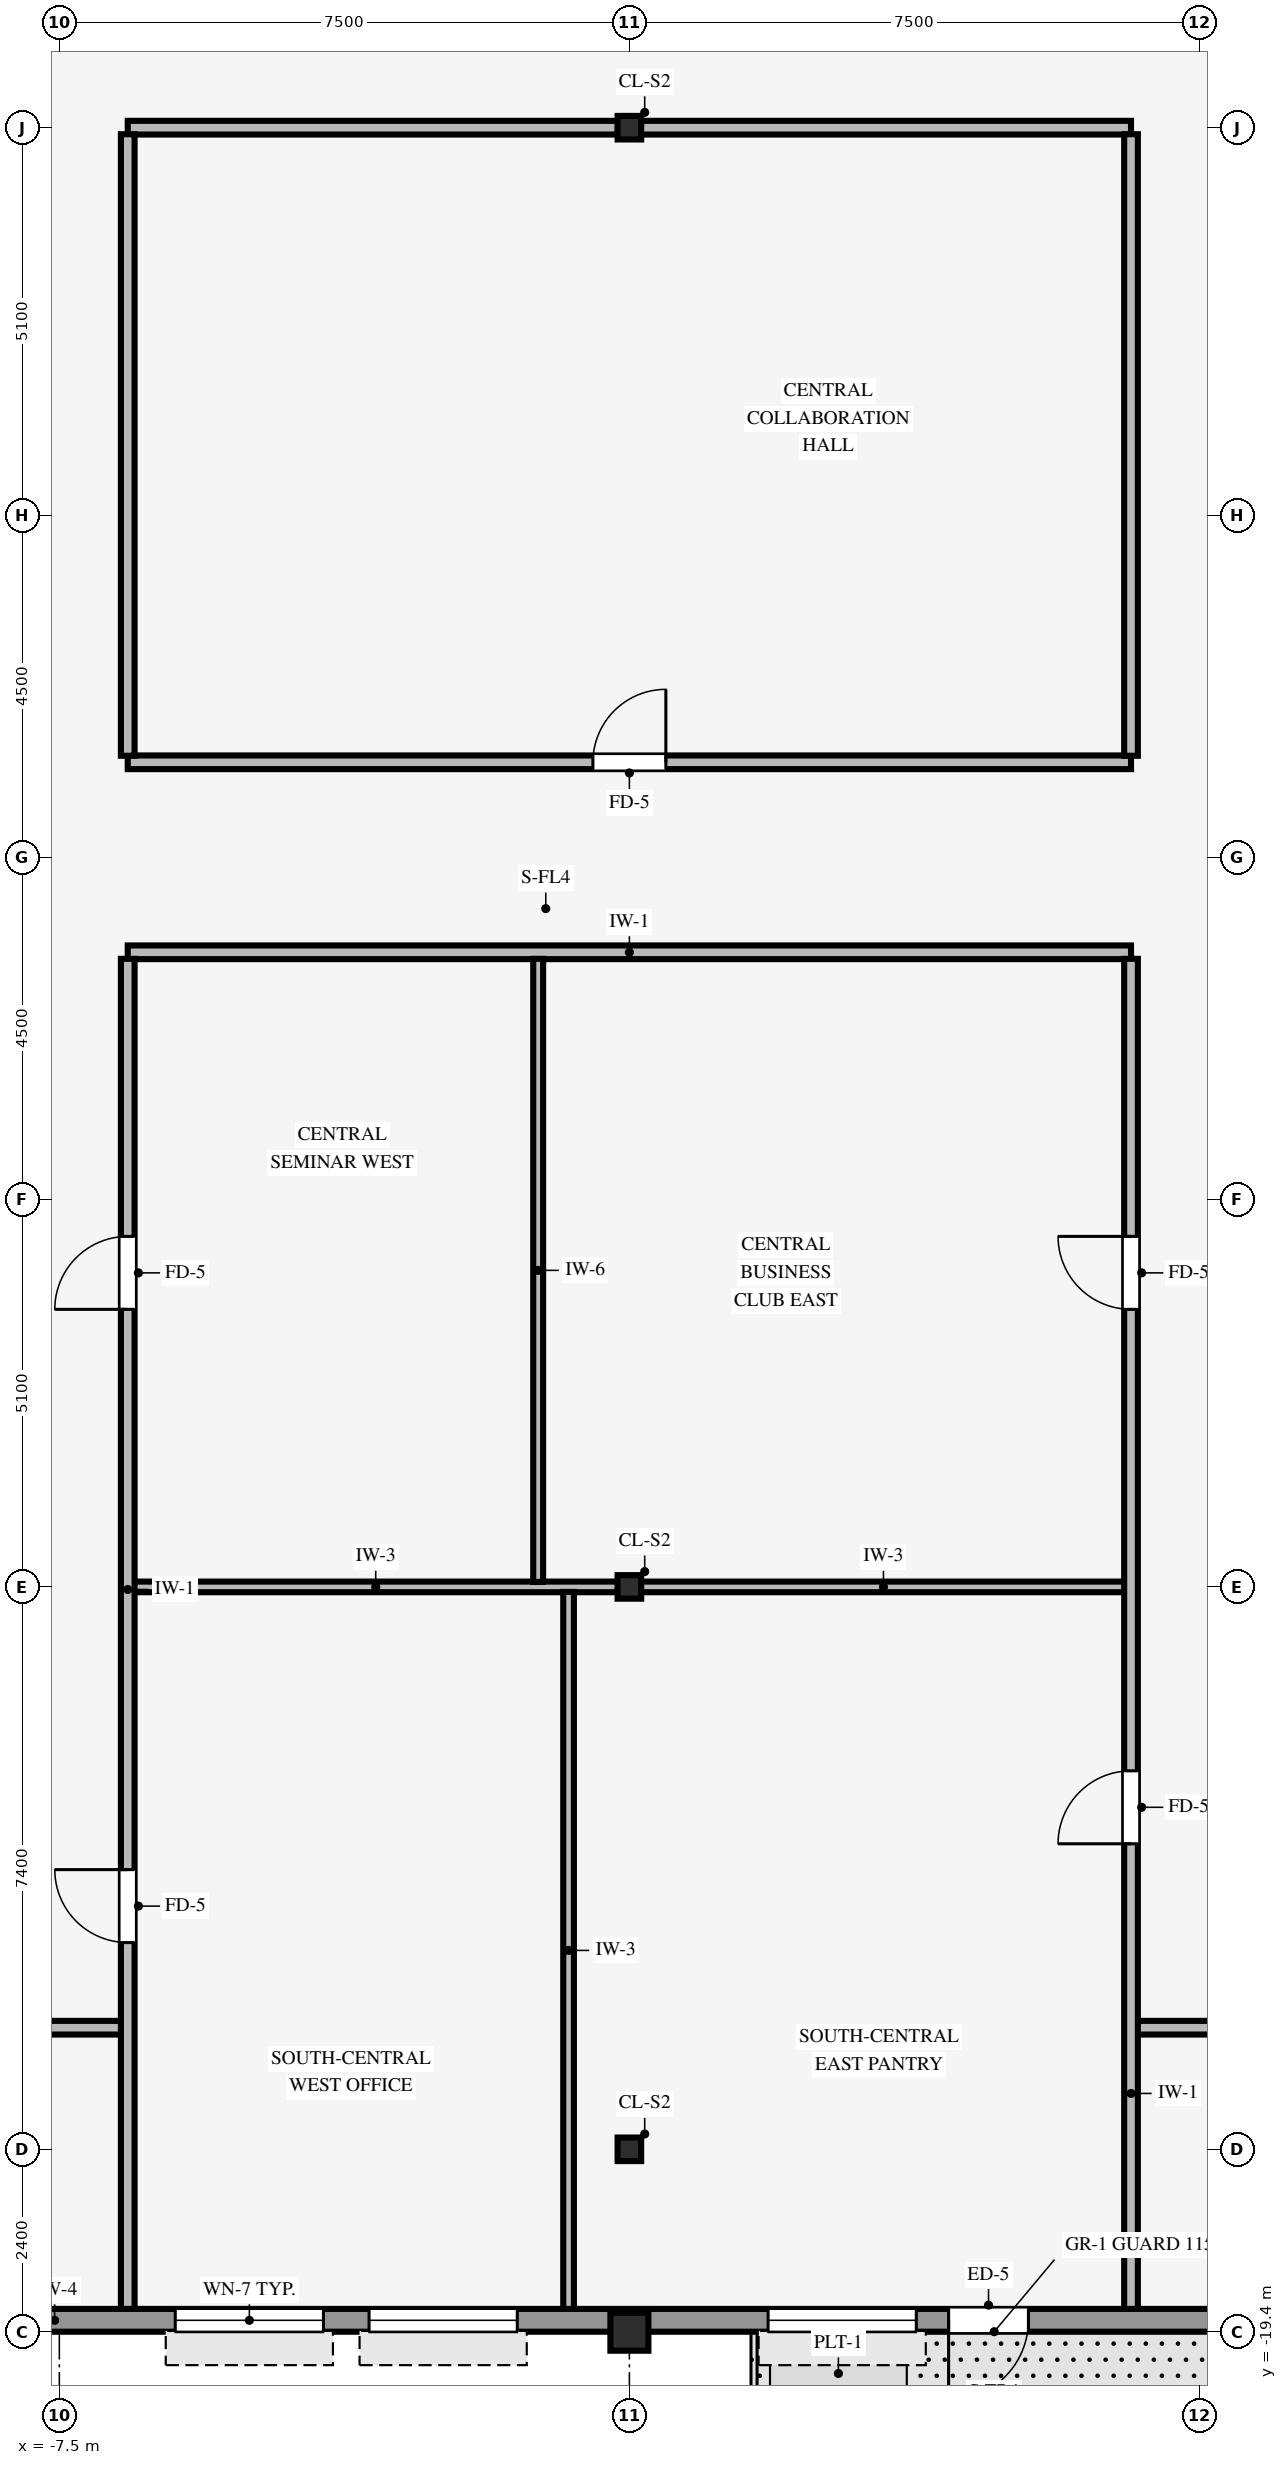
"""IFC4 building model, lengths in metres.
Left out: names, types, materials, properties, quantities, classifications, styles, units other than length and angle.
Written with IfcOpenShell. Run it as: python <this file> out.ifc"""

import sys

from ifc_helpers import new_model, si_unit, direction, frame, frame_2d, origin, origin_2d, place, context, subcontext, project, spatial, rectangle, hollow_rectangle, i_section, extrude, source, transform, mapped, element, fill, save


model = new_model("IFC4")
c1 = context("Model", 3, precision=1e-05, world=origin(), true_north=direction((0.0, 1.0)))
c2 = subcontext(c1, "Body", "Model", "MODEL_VIEW")
j1 = project(units=[si_unit("LENGTHUNIT", "METRE"), si_unit("PLANEANGLEUNIT", "RADIAN")], contexts=[c1])
p1 = place(None, origin())
s1 = spatial("IfcSite", under=j1, at=p1, CompositionType="ELEMENT")
p2 = place(p1, origin())
s2 = spatial("IfcBuilding", under=s1, at=p2, CompositionType="ELEMENT")
p3 = place(p2, frame((0.0, 0.0, 265.25)))
s3 = spatial("IfcBuildingStorey", under=s2, at=p3, CompositionType="ELEMENT", Elevation=265.25)
p4 = place(p3, frame((0.0, -19.4, 0.0), z_axis=(0.0, 0.0, 1.0), x_axis=(1.0, 0.0, 0.0)))
e1 = element("IfcColumn", 1, at=p4, inside=s3, PredefinedType="COLUMN", context=c2, shape_type="SweptSolid", body=[
    extrude(hollow_rectangle(XDim=0.5, YDim=0.5, WallThickness=0.032, InnerFilletRadius=0.032, OuterFilletRadius=0.064, at=origin_2d()), origin(), (0.0, 0.0, 1.0), 3.37),
])
for number, where, z_axis, x_axis in (
    (2, (0.0, -17.0, 0.0), (0.0, 0.0, 1.0), (1.0, 0.0, 0.0)),
    (3, (0.0, -9.6, 0.0), (0.0, 0.0, 1.0), (1.0, 0.0, 0.0)),
    (4, (0.0, 9.6, 0.0), (0.0, 0.0, 1.0), (1.0, 0.0, 0.0)),
):
    element("IfcColumn", number, at=place(p3, frame(where, z_axis=z_axis, x_axis=x_axis)), inside=s3, PredefinedType="COLUMN", context=c2, shape_type="SweptSolid", body=[
        extrude(i_section(OverallWidth=0.31, OverallDepth=0.31, WebThickness=0.015, FlangeThickness=0.015, FilletRadius=0.015, at=origin_2d()), origin(), (0.0, 0.0, 1.0), 3.37),
    ])
p5 = place(p3, frame((-18.9, -19.25, 0.0), z_axis=(0.0, 0.0, 1.0), x_axis=(1.0, 0.0, 0.0)))
e5 = element("IfcWall", 5, at=p5, inside=s3, PredefinedType="STANDARD", context=c2, shape_type="SweptSolid", body=[
    extrude(rectangle(XDim=35.6, YDim=0.3, at=frame_2d((17.8, 0.0))), origin(), (0.0, 0.0, 1.0), 2.705),
])
p6 = place(p5, frame((24.15, 0.0, 0.0), z_axis=(0.0, 0.0, 1.0), x_axis=(-1.0, 0.0, 0.0)))
e6 = element("IfcOpeningElement", 6, at=p6, cuts=e5, PredefinedType="OPENING", context=c2, shape_type="SweptSolid", body=[
    extrude(rectangle(XDim=1.05, YDim=2.1, at=frame_2d((0.525, 1.05))), frame((0.0, 0.16, 0.0), z_axis=(0.0, -1.0, 0.0), x_axis=(1.0, 0.0, 0.0)), (0.0, 0.0, 1.0), 0.32),
])
p7 = place(p5, frame((2.425, 0.0, 0.8)))
e7 = element("IfcOpeningElement", 7, at=p7, cuts=e5, PredefinedType="OPENING", context=c2, shape_type="SweptSolid", body=[
    extrude(rectangle(XDim=1.95, YDim=1.48, at=frame_2d((0.975, 0.74))), frame((0.0, 0.16, 0.0), z_axis=(0.0, -1.0, 0.0), x_axis=(1.0, 0.0, 0.0)), (0.0, 0.0, 1.0), 0.32),
])
p8 = place(p5, frame((7.225, 0.0, 0.8)))
e8 = element("IfcOpeningElement", 8, at=p8, cuts=e5, PredefinedType="OPENING", context=c2, shape_type="SweptSolid", body=[
    extrude(rectangle(XDim=1.95, YDim=1.48, at=frame_2d((0.975, 0.74))), frame((0.0, 0.16, 0.0), z_axis=(0.0, -1.0, 0.0), x_axis=(1.0, 0.0, 0.0)), (0.0, 0.0, 1.0), 0.32),
])
p9 = place(p5, frame((12.925, 0.0, 0.8)))
e9 = element("IfcOpeningElement", 9, at=p9, cuts=e5, PredefinedType="OPENING", context=c2, shape_type="SweptSolid", body=[
    extrude(rectangle(XDim=1.95, YDim=1.48, at=frame_2d((0.975, 0.74))), frame((0.0, 0.16, 0.0), z_axis=(0.0, -1.0, 0.0), x_axis=(1.0, 0.0, 0.0)), (0.0, 0.0, 1.0), 0.32),
])
p10 = place(p5, frame((15.475, 0.0, 0.8)))
e10 = element("IfcOpeningElement", 10, at=p10, cuts=e5, PredefinedType="OPENING", context=c2, shape_type="SweptSolid", body=[
    extrude(rectangle(XDim=1.95, YDim=1.48, at=frame_2d((0.975, 0.74))), frame((0.0, 0.16, 0.0), z_axis=(0.0, -1.0, 0.0), x_axis=(1.0, 0.0, 0.0)), (0.0, 0.0, 1.0), 0.32),
])
p11 = place(p5, frame((20.725, 0.0, 0.8)))
e11 = element("IfcOpeningElement", 11, at=p11, cuts=e5, PredefinedType="OPENING", context=c2, shape_type="SweptSolid", body=[
    extrude(rectangle(XDim=1.95, YDim=1.48, at=frame_2d((0.975, 0.74))), frame((0.0, 0.16, 0.0), z_axis=(0.0, -1.0, 0.0), x_axis=(1.0, 0.0, 0.0)), (0.0, 0.0, 1.0), 0.32),
])
p12 = place(p5, frame((31.225, 0.0, 0.8)))
e12 = element("IfcOpeningElement", 12, at=p12, cuts=e5, PredefinedType="OPENING", context=c2, shape_type="SweptSolid", body=[
    extrude(rectangle(XDim=1.95, YDim=1.48, at=frame_2d((0.975, 0.74))), frame((0.0, 0.16, 0.0), z_axis=(0.0, -1.0, 0.0), x_axis=(1.0, 0.0, 0.0)), (0.0, 0.0, 1.0), 0.32),
])
p13 = place(p3, frame((-9.0, -15.4, 0.0), z_axis=(0.0, 0.0, 1.0), x_axis=(1.0, 0.0, 0.0)))
e13 = element("IfcWall", 13, at=p13, inside=s3, PredefinedType="PARTITIONING", context=c2, shape_type="SweptSolid", body=[
    extrude(rectangle(XDim=2.324, YDim=0.18, at=frame_2d((1.162, 0.0))), origin(), (0.0, 0.0, 1.0), 3.36),
])
p14 = place(p3, frame((6.666, -15.4, 0.0), z_axis=(0.0, 0.0, 1.0), x_axis=(1.0, 0.0, 0.0)))
e14 = element("IfcWall", 14, at=p14, inside=s3, PredefinedType="PARTITIONING", context=c2, shape_type="SweptSolid", body=[
    extrude(rectangle(XDim=2.334, YDim=0.18, at=frame_2d((1.167, 0.0))), origin(), (0.0, 0.0, 1.0), 3.36),
])
p15 = place(p3, frame((-6.524, -9.6, 0.0), z_axis=(0.0, 0.0, 1.0), x_axis=(1.0, 0.0, 0.0)))
e15 = element("IfcWall", 15, at=p15, inside=s3, PredefinedType="PARTITIONING", context=c2, shape_type="SweptSolid", body=[
    extrude(rectangle(XDim=6.373, YDim=0.14, at=frame_2d((3.187, 0.0))), origin(), (0.0, 0.0, 1.0), 2.405),
])
p16 = place(p3, frame((0.151, -9.6, 0.0), z_axis=(0.0, 0.0, 1.0), x_axis=(1.0, 0.0, 0.0)))
e16 = element("IfcWall", 16, at=p16, inside=s3, PredefinedType="PARTITIONING", context=c2, shape_type="SweptSolid", body=[
    extrude(rectangle(XDim=6.383, YDim=0.14, at=frame_2d((3.191, 0.0))), origin(), (0.0, 0.0, 1.0), 2.405),
])
p17 = place(p3, frame((-6.6, -1.25, 0.0), z_axis=(0.0, 0.0, 1.0), x_axis=(1.0, 0.0, 0.0)))
e17 = element("IfcWall", 17, at=p17, inside=s3, PredefinedType="PARTITIONING", context=c2, shape_type="SweptSolid", body=[
    extrude(rectangle(XDim=13.2, YDim=0.18, at=frame_2d((6.6, 0.0))), origin(), (0.0, 0.0, 1.0), 3.36),
])
p18 = place(p3, frame((-6.6, 1.25, 0.0), z_axis=(0.0, 0.0, 1.0), x_axis=(1.0, 0.0, 0.0)))
e18 = element("IfcWall", 18, at=p18, inside=s3, PredefinedType="PARTITIONING", context=c2, shape_type="SweptSolid", body=[
    extrude(rectangle(XDim=13.2, YDim=0.18, at=frame_2d((6.6, 0.0))), origin(), (0.0, 0.0, 1.0), 3.36),
])
p19 = place(p18, frame((6.12, 0.0, 0.0)))
e19 = element("IfcOpeningElement", 19, at=p19, cuts=e18, PredefinedType="OPENING", context=c2, shape_type="SweptSolid", body=[
    extrude(rectangle(XDim=0.96, YDim=2.1, at=frame_2d((0.48, 1.05))), frame((0.0, 0.1, 0.0), z_axis=(0.0, -1.0, 0.0), x_axis=(1.0, 0.0, 0.0)), (0.0, 0.0, 1.0), 0.2),
])
for number, where, z_axis, x_axis in (
    (20, (-6.6, 9.6, 0.0), (0.0, 0.0, 1.0), (1.0, 0.0, 0.0)),
    (21, (0.151, 9.6, 0.0), (0.0, 0.0, 1.0), (1.0, 0.0, 0.0)),
):
    element("IfcWall", number, at=place(p3, frame(where, z_axis=z_axis, x_axis=x_axis)), inside=s3, PredefinedType="PARTITIONING", context=c2, shape_type="SweptSolid", body=[
        extrude(rectangle(XDim=6.449, YDim=0.18, at=frame_2d((3.225, 0.0))), origin(), (0.0, 0.0, 1.0), 2.405),
    ])
p20 = place(p3, frame((-6.6, -19.1, 0.0), z_axis=(0.0, 0.0, 1.0), x_axis=(0.0, 1.0, 0.0)))
e22 = element("IfcWall", 22, at=p20, inside=s3, PredefinedType="PARTITIONING", context=c2, shape_type="SweptSolid", body=[
    extrude(rectangle(XDim=17.764, YDim=0.18, at=frame_2d((8.882, 0.0))), origin(), (0.0, 0.0, 1.0), 3.36),
])
p21 = place(p20, frame((13.152, 0.0, 0.0)))
e23 = element("IfcOpeningElement", 23, at=p21, cuts=e22, PredefinedType="OPENING", context=c2, shape_type="SweptSolid", body=[
    extrude(rectangle(XDim=0.96, YDim=2.1, at=frame_2d((0.48, 1.05))), frame((0.0, 0.1, 0.0), z_axis=(0.0, -1.0, 0.0), x_axis=(1.0, 0.0, 0.0)), (0.0, 0.0, 1.0), 0.2),
])
p22 = place(p20, frame((4.82, 0.0, 0.0)))
e24 = element("IfcOpeningElement", 24, at=p22, cuts=e22, PredefinedType="OPENING", context=c2, shape_type="SweptSolid", body=[
    extrude(rectangle(XDim=0.96, YDim=2.1, at=frame_2d((0.48, 1.05))), frame((0.0, 0.1, 0.0), z_axis=(0.0, -1.0, 0.0), x_axis=(1.0, 0.0, 0.0)), (0.0, 0.0, 1.0), 0.2),
])
p23 = place(p3, frame((-6.6, 1.336, 0.0), z_axis=(0.0, 0.0, 1.0), x_axis=(0.0, 1.0, 0.0)))
e25 = element("IfcWall", 25, at=p23, inside=s3, PredefinedType="PARTITIONING", context=c2, shape_type="SweptSolid", body=[
    extrude(rectangle(XDim=8.178, YDim=0.18, at=frame_2d((4.089, 0.0))), origin(), (0.0, 0.0, 1.0), 3.36),
])
p24 = place(p3, frame((-1.2, -9.534, 0.0), z_axis=(0.0, 0.0, 1.0), x_axis=(0.0, 1.0, 0.0)))
e26 = element("IfcWall", 26, at=p24, inside=s3, PredefinedType="PARTITIONING", context=c2, shape_type="SweptSolid", body=[
    extrude(rectangle(XDim=8.198, YDim=0.13, at=frame_2d((4.099, 0.0))), origin(), (0.0, 0.0, 1.0), 3.36),
])
p25 = place(p3, frame((-0.8, -19.1, 0.0), z_axis=(0.0, 0.0, 1.0), x_axis=(0.0, 1.0, 0.0)))
e27 = element("IfcWall", 27, at=p25, inside=s3, PredefinedType="PARTITIONING", context=c2, shape_type="SweptSolid", body=[
    extrude(rectangle(XDim=9.434, YDim=0.14, at=frame_2d((4.717, 0.0))), origin(), (0.0, 0.0, 1.0), 3.36),
])
p26 = place(p3, frame((6.6, -19.1, 0.0), z_axis=(0.0, 0.0, 1.0), x_axis=(0.0, 1.0, 0.0)))
e28 = element("IfcWall", 28, at=p26, inside=s3, PredefinedType="PARTITIONING", context=c2, shape_type="SweptSolid", body=[
    extrude(rectangle(XDim=17.764, YDim=0.18, at=frame_2d((8.882, 0.0))), origin(), (0.0, 0.0, 1.0), 3.36),
])
p27 = place(p26, frame((13.152, 0.0, 0.0)))
e29 = element("IfcOpeningElement", 29, at=p27, cuts=e28, PredefinedType="OPENING", context=c2, shape_type="SweptSolid", body=[
    extrude(rectangle(XDim=0.96, YDim=2.1, at=frame_2d((0.48, 1.05))), frame((0.0, 0.1, 0.0), z_axis=(0.0, -1.0, 0.0), x_axis=(1.0, 0.0, 0.0)), (0.0, 0.0, 1.0), 0.2),
])
p28 = place(p26, frame((6.12, 0.0, 0.0)))
e30 = element("IfcOpeningElement", 30, at=p28, cuts=e28, PredefinedType="OPENING", context=c2, shape_type="SweptSolid", body=[
    extrude(rectangle(XDim=0.96, YDim=2.1, at=frame_2d((0.48, 1.05))), frame((0.0, 0.1, 0.0), z_axis=(0.0, -1.0, 0.0), x_axis=(1.0, 0.0, 0.0)), (0.0, 0.0, 1.0), 0.2),
])
p29 = place(p3, frame((6.6, 1.336, 0.0), z_axis=(0.0, 0.0, 1.0), x_axis=(0.0, 1.0, 0.0)))
e31 = element("IfcWall", 31, at=p29, inside=s3, PredefinedType="PARTITIONING", context=c2, shape_type="SweptSolid", body=[
    extrude(rectangle(XDim=8.178, YDim=0.18, at=frame_2d((4.089, 0.0))), origin(), (0.0, 0.0, 1.0), 3.36),
])
m1 = source(origin(), c2, "Body", "SweptSolid", [
    extrude(rectangle(XDim=1.05, YDim=2.1, at=frame_2d((0.525, 1.05))), frame((0.0, 0.025, 0.0), z_axis=(0.0, -1.0, 0.0), x_axis=(1.0, 0.0, 0.0)), (0.0, 0.0, 1.0), 0.05),
])
p30 = place(p6, origin())
e32 = element("IfcDoor", 32, at=p30, inside=s3, OperationType="SINGLE_SWING_RIGHT", PredefinedType="DOOR", context=c2, shape_type="MappedRepresentation", body=[
    mapped(m1, transform((0.0, 0.0, 0.0), scale=1.0)),
])
fill(e6, e32)
m2 = source(origin(), c2, "Body", "SweptSolid", [
    extrude(rectangle(XDim=1.95, YDim=1.48, at=frame_2d((0.975, 0.74))), frame((0.0, 0.03, 0.0), z_axis=(0.0, -1.0, 0.0), x_axis=(1.0, 0.0, 0.0)), (0.0, 0.0, 1.0), 0.06),
])
p31 = place(p9, origin())
e33 = element("IfcWindow", 33, at=p31, inside=s3, PartitioningType="SINGLE_PANEL", PredefinedType="WINDOW", context=c2, shape_type="MappedRepresentation", body=[
    mapped(m2, transform((0.0, 0.0, 0.0), scale=1.0)),
])
fill(e9, e33)
p32 = place(p10, origin())
e34 = element("IfcWindow", 34, at=p32, inside=s3, PartitioningType="SINGLE_PANEL", PredefinedType="WINDOW", context=c2, shape_type="MappedRepresentation", body=[
    mapped(m2, transform((0.0, 0.0, 0.0), scale=1.0)),
])
fill(e10, e34)
p33 = place(p11, origin())
e35 = element("IfcWindow", 35, at=p33, inside=s3, PartitioningType="SINGLE_PANEL", PredefinedType="WINDOW", context=c2, shape_type="MappedRepresentation", body=[
    mapped(m2, transform((0.0, 0.0, 0.0), scale=1.0)),
])
fill(e11, e35)
m3 = source(origin(), c2, "Body", "SweptSolid", [
    extrude(rectangle(XDim=0.96, YDim=2.1, at=frame_2d((0.48, 1.05))), frame((0.0, 0.025, 0.0), z_axis=(0.0, -1.0, 0.0), x_axis=(1.0, 0.0, 0.0)), (0.0, 0.0, 1.0), 0.05),
])
p34 = place(p19, origin())
e36 = element("IfcDoor", 36, at=p34, inside=s3, OperationType="SINGLE_SWING_RIGHT", PredefinedType="DOOR", context=c2, shape_type="MappedRepresentation", body=[
    mapped(m3, transform((0.0, 0.0, 0.0), scale=1.0)),
])
fill(e19, e36)
p35 = place(p21, origin())
e37 = element("IfcDoor", 37, at=p35, inside=s3, OperationType="SINGLE_SWING_LEFT", PredefinedType="DOOR", context=c2, shape_type="MappedRepresentation", body=[
    mapped(m3, transform((0.0, 0.0, 0.0), scale=1.0)),
])
fill(e23, e37)
p36 = place(p27, origin())
e38 = element("IfcDoor", 38, at=p36, inside=s3, OperationType="SINGLE_SWING_RIGHT", PredefinedType="DOOR", context=c2, shape_type="MappedRepresentation", body=[
    mapped(m3, transform((0.0, 0.0, 0.0), scale=1.0)),
])
fill(e29, e38)
p37 = place(p28, origin())
e39 = element("IfcDoor", 39, at=p37, inside=s3, OperationType="SINGLE_SWING_LEFT", PredefinedType="DOOR", context=c2, shape_type="MappedRepresentation", body=[
    mapped(m3, transform((0.0, 0.0, 0.0), scale=1.0)),
])
fill(e30, e39)
p38 = place(p22, origin())
e40 = element("IfcDoor", 40, at=p38, inside=s3, OperationType="SINGLE_SWING_RIGHT", PredefinedType="DOOR", context=c2, shape_type="MappedRepresentation", body=[
    mapped(m3, transform((0.0, 0.0, 0.0), scale=1.0)),
])
fill(e24, e40)
save(model, sys.argv[1])
